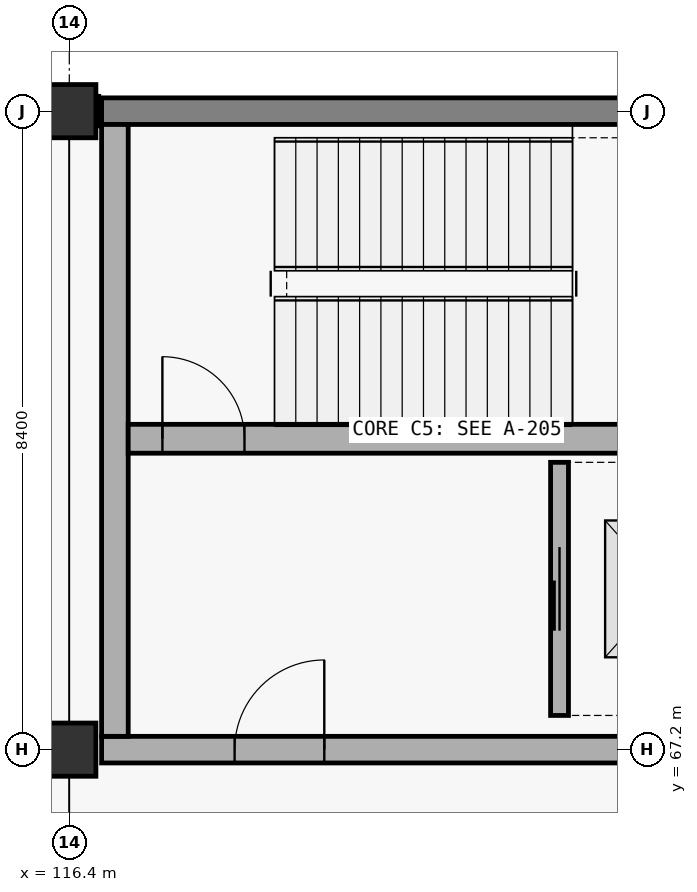
"""IFC4 building model, lengths in metres.
Left out: names, types, materials, properties, quantities, classifications, styles, units other than length and angle.
Written with IfcOpenShell. Run it as: python <this file> out.ifc"""

import sys

from ifc_helpers import new_model, si_unit, direction, frame, frame_2d, origin, origin_2d, place, context, subcontext, project, spatial, rectangle, extrude, element, fill, save


model = new_model("IFC4")
c1 = context("Model", 3, precision=1e-05, world=origin(), true_north=direction((0.0, 1.0)))
c2 = subcontext(c1, "Body", "Model", "MODEL_VIEW")
j1 = project(units=[si_unit("LENGTHUNIT", "METRE"), si_unit("PLANEANGLEUNIT", "RADIAN")], contexts=[c1])
p1 = place(None, origin())
s1 = spatial("IfcSite", under=j1, at=p1, CompositionType="ELEMENT")
p2 = place(p1, origin())
s2 = spatial("IfcBuilding", under=s1, at=p2, CompositionType="ELEMENT")
p3 = place(p2, frame((0.0, 0.0, 10.5)))
s3 = spatial("IfcBuildingStorey", under=s2, at=p3, CompositionType="ELEMENT", Elevation=10.5)
for number, where, z_axis, x_axis in (
    (1, (116.4, 67.2, 0.0), (0.0, 0.0, 1.0), (1.0, 0.0, 0.0)),
    (2, (116.4, 75.6, 0.0), (0.0, 0.0, 1.0), (1.0, 0.0, 0.0)),
):
    element("IfcColumn", number, at=place(p3, frame(where, z_axis=z_axis, x_axis=x_axis)), inside=s3, PredefinedType="COLUMN", context=c2, shape_type="SweptSolid", body=[
        extrude(rectangle(XDim=0.7, YDim=0.7, at=origin_2d()), origin(), (0.0, 0.0, 1.0), 5.1),
    ])
p4 = place(p3, frame((116.825, 67.2, 0.0), z_axis=(0.0, 0.0, 1.0), x_axis=(1.0, 0.0, 0.0)))
e3 = element("IfcWall", 3, at=p4, inside=s3, PredefinedType="SHEAR", context=c2, shape_type="SweptSolid", body=[
    extrude(rectangle(XDim=9.35, YDim=0.35, at=frame_2d((4.675, 0.0))), origin(), (0.0, 0.0, 1.0), 5.1),
])
p5 = place(p4, frame((1.75, 0.0, 0.0)))
e4 = element("IfcOpeningElement", 4, at=p5, cuts=e3, PredefinedType="OPENING", context=c2, shape_type="SweptSolid", body=[
    extrude(rectangle(XDim=1.18, YDim=2.24, at=frame_2d((0.59, 1.12))), frame((0.0, 0.185, 0.0), z_axis=(0.0, -1.0, 0.0), x_axis=(1.0, 0.0, 0.0)), (0.0, 0.0, 1.0), 0.37),
])
p6 = place(p3, frame((116.825, 75.6, 0.0), z_axis=(0.0, 0.0, 1.0), x_axis=(1.0, 0.0, 0.0)))
e5 = element("IfcWall", 5, at=p6, inside=s3, PredefinedType="SHEAR", context=c2, shape_type="SweptSolid", body=[
    extrude(rectangle(XDim=9.35, YDim=0.35, at=frame_2d((4.675, 0.0))), origin(), (0.0, 0.0, 1.0), 5.1),
])
p7 = place(p3, frame((117.0, 67.375, 0.0), z_axis=(0.0, 0.0, 1.0), x_axis=(0.0, 1.0, 0.0)))
e6 = element("IfcWall", 6, at=p7, inside=s3, PredefinedType="SHEAR", context=c2, shape_type="SweptSolid", body=[
    extrude(rectangle(XDim=8.05, YDim=0.35, at=frame_2d((4.025, 0.0))), origin(), (0.0, 0.0, 1.0), 5.1),
])
p8 = place(p3, frame((117.175, 71.29, 0.0), z_axis=(0.0, 0.0, 1.0), x_axis=(1.0, 0.0, 0.0)))
e7 = element("IfcWall", 7, at=p8, inside=s3, PredefinedType="SHEAR", context=c2, shape_type="SweptSolid", body=[
    extrude(rectangle(XDim=8.65, YDim=0.38, at=frame_2d((4.325, 0.0))), origin(), (0.0, 0.0, 1.0), 5.1),
])
p9 = place(p8, frame((0.45, 0.0, 0.0)))
e8 = element("IfcOpeningElement", 8, at=p9, cuts=e7, PredefinedType="OPENING", context=c2, shape_type="SweptSolid", body=[
    extrude(rectangle(XDim=1.08, YDim=2.18, at=frame_2d((0.54, 1.09))), frame((0.0, 0.2, 0.0), z_axis=(0.0, -1.0, 0.0), x_axis=(1.0, 0.0, 0.0)), (0.0, 0.0, 1.0), 0.4),
])
p10 = place(p3, frame((108.352, 75.6, 0.0), z_axis=(0.0, 0.0, 1.0), x_axis=(1.0, 0.0, 0.0)))
e9 = element("IfcWall", 9, at=p10, inside=s3, PredefinedType="SOLIDWALL", context=c2, shape_type="SweptSolid", body=[
    extrude(rectangle(XDim=8.436, YDim=0.39, at=frame_2d((4.218, 0.0))), origin(), (0.0, 0.0, 1.0), 3.9),
])
p11 = place(p10, frame((1.168, 0.0, 0.85)))
e10 = element("IfcOpeningElement", 10, at=p11, cuts=e9, PredefinedType="OPENING", context=c2, shape_type="SweptSolid", body=[
    extrude(rectangle(XDim=1.6, YDim=2.5, at=frame_2d((0.8, 1.25))), frame((0.0, 0.205, 0.0), z_axis=(0.0, -1.0, 0.0), x_axis=(1.0, 0.0, 0.0)), (0.0, 0.0, 1.0), 0.41),
])
p12 = place(p10, frame((4.068, 0.0, 0.85)))
e11 = element("IfcOpeningElement", 11, at=p12, cuts=e9, PredefinedType="OPENING", context=c2, shape_type="SweptSolid", body=[
    extrude(rectangle(XDim=1.95, YDim=2.3, at=frame_2d((0.975, 1.15))), frame((0.0, 0.205, 0.0), z_axis=(0.0, -1.0, 0.0), x_axis=(1.0, 0.0, 0.0)), (0.0, 0.0, 1.0), 0.41),
])
p13 = place(p3, frame((122.85, 67.65, 0.0), z_axis=(0.0, 0.0, 1.0), x_axis=(0.0, 1.0, 0.0)))
e12 = element("IfcWall", 12, at=p13, inside=s3, PredefinedType="PARTITIONING", context=c2, shape_type="SweptSolid", body=[
    extrude(rectangle(XDim=3.33, YDim=0.235, at=frame_2d((1.665, 0.0))), origin(), (0.0, 0.0, 1.0), 4.72),
])
p14 = place(p13, frame((1.115, 0.0, 0.0)))
e13 = element("IfcOpeningElement", 13, at=p14, cuts=e12, PredefinedType="OPENING", context=c2, shape_type="SweptSolid", body=[
    extrude(rectangle(XDim=1.1, YDim=2.2, at=frame_2d((0.55, 1.1))), frame((0.0, 0.127, 0.0), z_axis=(0.0, -1.0, 0.0), x_axis=(1.0, 0.0, 0.0)), (0.0, 0.0, 1.0), 0.255),
])
p15 = place(p9, origin())
e14 = element("IfcDoor", 14, at=p15, inside=s3, OperationType="SINGLE_SWING_LEFT", PredefinedType="DOOR", context=c2, shape_type="SweptSolid", body=[
    extrude(rectangle(XDim=1.08, YDim=2.18, at=frame_2d((0.54, 1.09))), frame((0.0, 0.025, 0.0), z_axis=(0.0, -1.0, 0.0), x_axis=(1.0, 0.0, 0.0)), (0.0, 0.0, 1.0), 0.05),
])
fill(e8, e14)
p16 = place(p5, origin())
e15 = element("IfcDoor", 15, at=p16, inside=s3, OperationType="SINGLE_SWING_RIGHT", PredefinedType="DOOR", context=c2, shape_type="SweptSolid", body=[
    extrude(rectangle(XDim=1.18, YDim=2.24, at=frame_2d((0.59, 1.12))), frame((0.0, 0.025, 0.0), z_axis=(0.0, -1.0, 0.0), x_axis=(1.0, 0.0, 0.0)), (0.0, 0.0, 1.0), 0.05),
])
fill(e4, e15)
p17 = place(p14, origin())
e16 = element("IfcDoor", 16, at=p17, inside=s3, OperationType="SLIDING_TO_LEFT", PredefinedType="DOOR", context=c2, shape_type="SweptSolid", body=[
    extrude(rectangle(XDim=1.1, YDim=2.2, at=frame_2d((0.55, 1.1))), frame((0.0, 0.025, 0.0), z_axis=(0.0, -1.0, 0.0), x_axis=(1.0, 0.0, 0.0)), (0.0, 0.0, 1.0), 0.05),
])
fill(e13, e16)
save(model, sys.argv[1])
